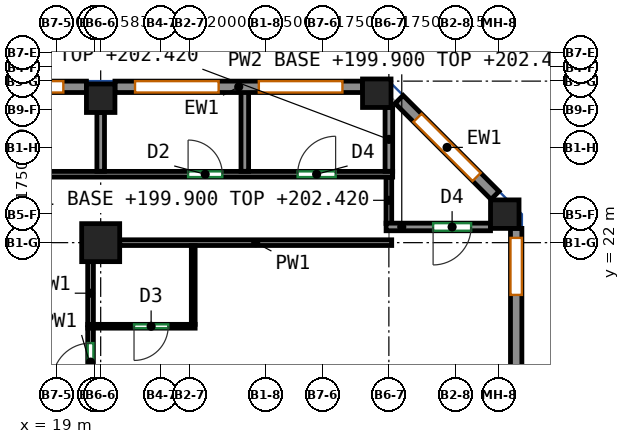
"""IFC4 building model, lengths in metres.
Left out: names, types, materials, properties, quantities, classifications, styles, units other than length and angle.
Written with IfcOpenShell. Run it as: python <this file> out.ifc"""

import sys

from ifc_helpers import new_model, si_unit, direction, frame, frame_2d, origin, origin_2d, place, context, subcontext, project, spatial, rectangle, extrude, source, transform, mapped, element, fill, save


model = new_model("IFC4")
c1 = context("Model", 3, precision=1e-05, world=origin(), true_north=direction((0.0, 1.0)))
c2 = subcontext(c1, "Body", "Model", "MODEL_VIEW")
j1 = project(units=[si_unit("LENGTHUNIT", "METRE"), si_unit("PLANEANGLEUNIT", "RADIAN")], contexts=[c1])
p1 = place(None, origin())
s1 = spatial("IfcSite", under=j1, at=p1, CompositionType="ELEMENT")
p2 = place(p1, origin())
s2 = spatial("IfcBuilding", under=s1, at=p2, CompositionType="ELEMENT")
p3 = place(p2, frame((0.0, 0.0, 199.9)))
s3 = spatial("IfcBuildingStorey", under=s2, at=p3, CompositionType="ELEMENT", Elevation=199.9)
m1 = source(origin(), c2, "Body", "SweptSolid", [
    extrude(rectangle(XDim=1.0, YDim=1.0, at=origin_2d()), origin(), (0.0, 0.0, 1.0), 3.12),
])
p4 = place(p3, frame((20.167, 22.0, 0.0), z_axis=(0.0, 0.0, 1.0), x_axis=(1.0, 0.0, 0.0)))
e1 = element("IfcColumn", 1, at=p4, inside=s3, PredefinedType="COLUMN", context=c2, shape_type="MappedRepresentation", body=[
    mapped(m1, transform((0.0, 0.0, 0.0))),
])
m2 = source(origin(), c2, "Body", "SweptSolid", [
    extrude(rectangle(XDim=0.75, YDim=0.75, at=origin_2d()), origin(), (0.0, 0.0, 1.0), 3.12),
])
for number, where, z_axis, x_axis in (
    (2, (20.167, 25.8, 0.0), (0.0, 0.0, 1.0), (1.0, 0.0, 0.0)),
    (3, (27.432, 25.932, 0.0), (0.0, 0.0, 1.0), (1.0, 0.0, 0.0)),
    (4, (30.8, 22.75, 0.0), (0.0, 0.0, 1.0), (1.0, 0.0, 0.0)),
):
    element("IfcColumn", number, at=place(p3, frame(where, z_axis=z_axis, x_axis=x_axis)), inside=s3, PredefinedType="COLUMN", context=c2, shape_type="MappedRepresentation", body=[
        mapped(m2, transform((0.0, 0.0, 0.0))),
    ])
m3 = source(origin(), c2, "Body", "SweptSolid", [
    extrude(rectangle(XDim=14.0, YDim=0.3, at=frame_2d((7.0, 0.0))), origin(), (0.0, 0.0, 1.0), 3.12),
])
p5 = place(p3, frame((31.1, 8.375, 0.0), z_axis=(0.0, 0.0, 1.0), x_axis=(0.0, 1.0, 0.0)))
e5 = element("IfcWall", 5, at=p5, inside=s3, PredefinedType="SOLIDWALL", context=c2, shape_type="MappedRepresentation", body=[
    mapped(m3, transform((0.0, 0.0, 0.0))),
])
p6 = place(p5, frame((1.75, 0.0, 0.85)))
e6 = element("IfcOpeningElement", 6, at=p6, cuts=e5, PredefinedType="OPENING", context=c2, shape_type="SweptSolid", body=[
    extrude(rectangle(XDim=1.5, YDim=1.95, at=frame_2d((0.75, 0.975))), frame((0.0, 0.16, 0.0), z_axis=(0.0, -1.0, 0.0), x_axis=(1.0, 0.0, 0.0)), (0.0, 0.0, 1.0), 0.32),
])
p7 = place(p5, frame((5.25, 0.0, 0.85)))
e7 = element("IfcOpeningElement", 7, at=p7, cuts=e5, PredefinedType="OPENING", context=c2, shape_type="SweptSolid", body=[
    extrude(rectangle(XDim=1.5, YDim=1.95, at=frame_2d((0.75, 0.975))), frame((0.0, 0.16, 0.0), z_axis=(0.0, -1.0, 0.0), x_axis=(1.0, 0.0, 0.0)), (0.0, 0.0, 1.0), 0.32),
])
p8 = place(p5, frame((8.75, 0.0, 0.85)))
e8 = element("IfcOpeningElement", 8, at=p8, cuts=e5, PredefinedType="OPENING", context=c2, shape_type="SweptSolid", body=[
    extrude(rectangle(XDim=1.5, YDim=1.95, at=frame_2d((0.75, 0.975))), frame((0.0, 0.16, 0.0), z_axis=(0.0, -1.0, 0.0), x_axis=(1.0, 0.0, 0.0)), (0.0, 0.0, 1.0), 0.32),
])
p9 = place(p5, frame((12.25, 0.0, 0.85)))
e9 = element("IfcOpeningElement", 9, at=p9, cuts=e5, PredefinedType="OPENING", context=c2, shape_type="SweptSolid", body=[
    extrude(rectangle(XDim=1.5, YDim=1.95, at=frame_2d((0.75, 0.975))), frame((0.0, 0.16, 0.0), z_axis=(0.0, -1.0, 0.0), x_axis=(1.0, 0.0, 0.0)), (0.0, 0.0, 1.0), 0.32),
])
m4 = source(origin(), c2, "Body", "SweptSolid", [
    extrude(rectangle(XDim=3.571, YDim=0.3, at=frame_2d((1.786, 0.0))), origin(), (0.0, 0.0, 1.0), 3.12),
])
p10 = place(p3, frame((30.544, 23.244, 0.0), z_axis=(0.0, 0.0, 1.0), x_axis=(-0.707140964879, 0.707072595841, 0.0)))
e10 = element("IfcWall", 10, at=p10, inside=s3, PredefinedType="SOLIDWALL", context=c2, shape_type="MappedRepresentation", body=[
    mapped(m4, transform((0.0, 0.0, 0.0))),
])
p11 = place(p10, frame((0.686, 0.0, 0.85)))
e11 = element("IfcOpeningElement", 11, at=p11, cuts=e10, PredefinedType="OPENING", context=c2, shape_type="SweptSolid", body=[
    extrude(rectangle(XDim=2.2, YDim=1.95, at=frame_2d((1.1, 0.975))), frame((0.0, 0.16, 0.0), z_axis=(0.0, -1.0, 0.0), x_axis=(1.0, 0.0, 0.0)), (0.0, 0.0, 1.0), 0.32),
])
m5 = source(origin(), c2, "Body", "SweptSolid", [
    extrude(rectangle(XDim=6.515, YDim=0.3, at=frame_2d((3.258, 0.0))), origin(), (0.0, 0.0, 1.0), 3.12),
])
p12 = place(p3, frame((27.057, 26.1, 0.0), z_axis=(0.0, 0.0, 1.0), x_axis=(-1.0, 0.0, 0.0)))
e12 = element("IfcWall", 12, at=p12, inside=s3, PredefinedType="SOLIDWALL", context=c2, shape_type="MappedRepresentation", body=[
    mapped(m5, transform((0.0, 0.0, 0.0))),
])
p13 = place(p12, frame((0.529, 0.0, 0.85)))
e13 = element("IfcOpeningElement", 13, at=p13, cuts=e12, PredefinedType="OPENING", context=c2, shape_type="SweptSolid", body=[
    extrude(rectangle(XDim=2.2, YDim=1.95, at=frame_2d((1.1, 0.975))), frame((0.0, 0.16, 0.0), z_axis=(0.0, -1.0, 0.0), x_axis=(1.0, 0.0, 0.0)), (0.0, 0.0, 1.0), 0.32),
])
p14 = place(p12, frame((3.786, 0.0, 0.85)))
e14 = element("IfcOpeningElement", 14, at=p14, cuts=e12, PredefinedType="OPENING", context=c2, shape_type="SweptSolid", body=[
    extrude(rectangle(XDim=2.2, YDim=1.95, at=frame_2d((1.1, 0.975))), frame((0.0, 0.16, 0.0), z_axis=(0.0, -1.0, 0.0), x_axis=(1.0, 0.0, 0.0)), (0.0, 0.0, 1.0), 0.32),
])
m6 = source(origin(), c2, "Body", "SweptSolid", [
    extrude(rectangle(XDim=6.833, YDim=0.3, at=frame_2d((3.417, 0.0))), origin(), (0.0, 0.0, 1.0), 3.12),
])
p15 = place(p3, frame((19.792, 26.1, 0.0), z_axis=(0.0, 0.0, 1.0), x_axis=(-1.0, 0.0, 0.0)))
e15 = element("IfcWall", 15, at=p15, inside=s3, PredefinedType="SOLIDWALL", context=c2, shape_type="MappedRepresentation", body=[
    mapped(m6, transform((0.0, 0.0, 0.0))),
])
p16 = place(p15, frame((0.608, 0.0, 0.85)))
e16 = element("IfcOpeningElement", 16, at=p16, cuts=e15, PredefinedType="OPENING", context=c2, shape_type="SweptSolid", body=[
    extrude(rectangle(XDim=2.2, YDim=1.95, at=frame_2d((1.1, 0.975))), frame((0.0, 0.16, 0.0), z_axis=(0.0, -1.0, 0.0), x_axis=(1.0, 0.0, 0.0)), (0.0, 0.0, 1.0), 0.32),
])
p17 = place(p15, frame((4.025, 0.0, 0.85)))
e17 = element("IfcOpeningElement", 17, at=p17, cuts=e15, PredefinedType="OPENING", context=c2, shape_type="SweptSolid", body=[
    extrude(rectangle(XDim=2.2, YDim=1.95, at=frame_2d((1.1, 0.975))), frame((0.0, 0.16, 0.0), z_axis=(0.0, -1.0, 0.0), x_axis=(1.0, 0.0, 0.0)), (0.0, 0.0, 1.0), 0.32),
])
p18 = place(p3, frame((19.9, 17.75, 0.0), z_axis=(0.0, 0.0, 1.0), x_axis=(0.0, 1.0, 0.0)))
e18 = element("IfcWall", 18, at=p18, inside=s3, PredefinedType="PARTITIONING", context=c2, shape_type="SweptSolid", body=[
    extrude(rectangle(XDim=2.01, YDim=0.15, at=frame_2d((1.005, 0.0))), origin(), (0.0, 0.0, 1.0), 3.12),
])
p19 = place(p18, frame((0.607, 0.0, 0.0)))
e19 = element("IfcOpeningElement", 19, at=p19, cuts=e18, PredefinedType="OPENING", context=c2, shape_type="SweptSolid", body=[
    extrude(rectangle(XDim=1.0, YDim=2.1, at=frame_2d((0.5, 1.05))), frame((0.0, 0.085, 0.0), z_axis=(0.0, -1.0, 0.0), x_axis=(1.0, 0.0, 0.0)), (0.0, 0.0, 1.0), 0.17),
])
p20 = place(p3, frame((20.667, 22.0, 0.0), z_axis=(0.0, 0.0, 1.0), x_axis=(1.0, 0.0, 0.0)))
e20 = element("IfcWall", 20, at=p20, inside=s3, PredefinedType="PARTITIONING", context=c2, shape_type="SweptSolid", body=[
    extrude(rectangle(XDim=7.158, YDim=0.15, at=frame_2d((3.579, 0.0))), origin(), (0.0, 0.0, 1.0), 3.12),
])
p21 = place(p3, frame((19.9, 19.84, 0.0), z_axis=(0.0, 0.0, 1.0), x_axis=(0.0, 1.0, 0.0)))
e21 = element("IfcWall", 21, at=p21, inside=s3, PredefinedType="PARTITIONING", context=c2, shape_type="SweptSolid", body=[
    extrude(rectangle(XDim=1.66, YDim=0.15, at=frame_2d((0.83, 0.0))), origin(), (0.0, 0.0, 1.0), 3.12),
])
p22 = place(p3, frame((27.75, 22.503, 0.0), z_axis=(0.0, 0.0, 1.0), x_axis=(0.0, 1.0, 0.0)))
e22 = element("IfcWall", 22, at=p22, inside=s3, PredefinedType="PARTITIONING", context=c2, shape_type="SweptSolid", body=[
    extrude(rectangle(XDim=1.222, YDim=0.15, at=frame_2d((0.611, 0.0))), origin(), (0.0, 0.0, 1.0), 2.52),
])
p23 = place(p3, frame((-17.85, 23.8, 0.0), z_axis=(0.0, 0.0, 1.0), x_axis=(1.0, 0.0, 0.0)))
e23 = element("IfcWall", 23, at=p23, inside=s3, PredefinedType="PARTITIONING", context=c2, shape_type="SweptSolid", body=[
    extrude(rectangle(XDim=45.7, YDim=0.15, at=frame_2d((22.85, 0.0))), origin(), (0.0, 0.0, 1.0), 3.12),
])
p24 = place(p23, frame((0.6, 0.0, 0.0)))
e24 = element("IfcOpeningElement", 24, at=p24, cuts=e23, PredefinedType="OPENING", context=c2, shape_type="SweptSolid", body=[
    extrude(rectangle(XDim=0.9, YDim=2.1, at=frame_2d((0.45, 1.05))), frame((0.0, 0.085, 0.0), z_axis=(0.0, -1.0, 0.0), x_axis=(1.0, 0.0, 0.0)), (0.0, 0.0, 1.0), 0.17),
])
p25 = place(p23, frame((4.081, 0.0, 0.0)))
e25 = element("IfcOpeningElement", 25, at=p25, cuts=e23, PredefinedType="OPENING", context=c2, shape_type="SweptSolid", body=[
    extrude(rectangle(XDim=1.0, YDim=2.1, at=frame_2d((0.5, 1.05))), frame((0.0, 0.085, 0.0), z_axis=(0.0, -1.0, 0.0), x_axis=(1.0, 0.0, 0.0)), (0.0, 0.0, 1.0), 0.17),
])
p26 = place(p23, frame((9.481, 0.0, 0.0)))
e26 = element("IfcOpeningElement", 26, at=p26, cuts=e23, PredefinedType="OPENING", context=c2, shape_type="SweptSolid", body=[
    extrude(rectangle(XDim=0.9, YDim=2.1, at=frame_2d((0.45, 1.05))), frame((0.0, 0.085, 0.0), z_axis=(0.0, -1.0, 0.0), x_axis=(1.0, 0.0, 0.0)), (0.0, 0.0, 1.0), 0.17),
])
p27 = place(p23, frame((12.803, 0.0, 0.0)))
e27 = element("IfcOpeningElement", 27, at=p27, cuts=e23, PredefinedType="OPENING", context=c2, shape_type="SweptSolid", body=[
    extrude(rectangle(XDim=1.0, YDim=2.1, at=frame_2d((0.5, 1.05))), frame((0.0, 0.085, 0.0), z_axis=(0.0, -1.0, 0.0), x_axis=(1.0, 0.0, 0.0)), (0.0, 0.0, 1.0), 0.17),
])
p28 = place(p23, frame((15.489, 0.0, 0.0)))
e28 = element("IfcOpeningElement", 28, at=p28, cuts=e23, PredefinedType="OPENING", context=c2, shape_type="SweptSolid", body=[
    extrude(rectangle(XDim=0.9, YDim=2.1, at=frame_2d((0.45, 1.05))), frame((0.0, 0.085, 0.0), z_axis=(0.0, -1.0, 0.0), x_axis=(1.0, 0.0, 0.0)), (0.0, 0.0, 1.0), 0.17),
])
p29 = place(p23, frame((21.244, 0.0, 0.0)))
e29 = element("IfcOpeningElement", 29, at=p29, cuts=e23, PredefinedType="OPENING", context=c2, shape_type="SweptSolid", body=[
    extrude(rectangle(XDim=0.9, YDim=2.1, at=frame_2d((0.45, 1.05))), frame((0.0, 0.085, 0.0), z_axis=(0.0, -1.0, 0.0), x_axis=(1.0, 0.0, 0.0)), (0.0, 0.0, 1.0), 0.17),
])
p30 = place(p23, frame((23.542, 0.0, 0.0)))
e30 = element("IfcOpeningElement", 30, at=p30, cuts=e23, PredefinedType="OPENING", context=c2, shape_type="SweptSolid", body=[
    extrude(rectangle(XDim=1.0, YDim=2.1, at=frame_2d((0.5, 1.05))), frame((0.0, 0.085, 0.0), z_axis=(0.0, -1.0, 0.0), x_axis=(1.0, 0.0, 0.0)), (0.0, 0.0, 1.0), 0.17),
])
p31 = place(p23, frame((28.841, 0.0, 0.0)))
e31 = element("IfcOpeningElement", 31, at=p31, cuts=e23, PredefinedType="OPENING", context=c2, shape_type="SweptSolid", body=[
    extrude(rectangle(XDim=0.9, YDim=2.1, at=frame_2d((0.45, 1.05))), frame((0.0, 0.085, 0.0), z_axis=(0.0, -1.0, 0.0), x_axis=(1.0, 0.0, 0.0)), (0.0, 0.0, 1.0), 0.17),
])
p32 = place(p23, frame((32.331, 0.0, 0.0)))
e32 = element("IfcOpeningElement", 32, at=p32, cuts=e23, PredefinedType="OPENING", context=c2, shape_type="SweptSolid", body=[
    extrude(rectangle(XDim=1.0, YDim=2.1, at=frame_2d((0.5, 1.05))), frame((0.0, 0.085, 0.0), z_axis=(0.0, -1.0, 0.0), x_axis=(1.0, 0.0, 0.0)), (0.0, 0.0, 1.0), 0.17),
])
p33 = place(p23, frame((35.42, 0.0, 0.0)))
e33 = element("IfcOpeningElement", 33, at=p33, cuts=e23, PredefinedType="OPENING", context=c2, shape_type="SweptSolid", body=[
    extrude(rectangle(XDim=0.9, YDim=2.1, at=frame_2d((0.45, 1.05))), frame((0.0, 0.085, 0.0), z_axis=(0.0, -1.0, 0.0), x_axis=(1.0, 0.0, 0.0)), (0.0, 0.0, 1.0), 0.17),
])
p34 = place(p23, frame((40.317, 0.0, 0.0)))
e34 = element("IfcOpeningElement", 34, at=p34, cuts=e23, PredefinedType="OPENING", context=c2, shape_type="SweptSolid", body=[
    extrude(rectangle(XDim=0.9, YDim=2.1, at=frame_2d((0.45, 1.05))), frame((0.0, 0.085, 0.0), z_axis=(0.0, -1.0, 0.0), x_axis=(1.0, 0.0, 0.0)), (0.0, 0.0, 1.0), 0.17),
])
p35 = place(p23, frame((43.199, 0.0, 0.0)))
e35 = element("IfcOpeningElement", 35, at=p35, cuts=e23, PredefinedType="OPENING", context=c2, shape_type="SweptSolid", body=[
    extrude(rectangle(XDim=1.0, YDim=2.1, at=frame_2d((0.5, 1.05))), frame((0.0, 0.085, 0.0), z_axis=(0.0, -1.0, 0.0), x_axis=(1.0, 0.0, 0.0)), (0.0, 0.0, 1.0), 0.17),
])
p36 = place(p3, frame((22.652, 19.8, 0.0), z_axis=(0.0, 0.0, 1.0), x_axis=(-1.0, 0.0, 0.0)))
e36 = element("IfcWall", 36, at=p36, inside=s3, PredefinedType="PARTITIONING", context=c2, shape_type="SweptSolid", body=[
    extrude(rectangle(XDim=2.825, YDim=0.1, at=frame_2d((1.413, 0.0))), origin(), (0.0, 0.0, 1.0), 3.12),
])
p37 = place(p36, frame((0.708, 0.0, 0.0)))
e37 = element("IfcOpeningElement", 37, at=p37, cuts=e36, PredefinedType="OPENING", context=c2, shape_type="SweptSolid", body=[
    extrude(rectangle(XDim=0.9, YDim=2.1, at=frame_2d((0.45, 1.05))), frame((0.0, 0.06, 0.0), z_axis=(0.0, -1.0, 0.0), x_axis=(1.0, 0.0, 0.0)), (0.0, 0.0, 1.0), 0.12),
])
p38 = place(p3, frame((22.602, 19.85, 0.0), z_axis=(0.0, 0.0, 1.0), x_axis=(0.0, 1.0, 0.0)))
e38 = element("IfcWall", 38, at=p38, inside=s3, PredefinedType="PARTITIONING", context=c2, shape_type="SweptSolid", body=[
    extrude(rectangle(XDim=2.073, YDim=0.1, at=frame_2d((1.037, 0.0))), origin(), (0.0, 0.0, 1.0), 3.12),
])
p39 = place(p3, frame((30.425, 22.413, 0.0), z_axis=(0.0, 0.0, 1.0), x_axis=(-1.0, 0.0, 0.0)))
e39 = element("IfcWall", 39, at=p39, inside=s3, PredefinedType="PARTITIONING", context=c2, shape_type="SweptSolid", body=[
    extrude(rectangle(XDim=2.748, YDim=0.2, at=frame_2d((1.374, 0.0))), origin(), (0.0, 0.0, 1.0), 2.52),
])
p40 = place(p39, frame((0.511, 0.0, 0.0)))
e40 = element("IfcOpeningElement", 40, at=p40, cuts=e39, PredefinedType="OPENING", context=c2, shape_type="SweptSolid", body=[
    extrude(rectangle(XDim=1.0, YDim=2.1, at=frame_2d((0.5, 1.05))), frame((0.0, 0.11, 0.0), z_axis=(0.0, -1.0, 0.0), x_axis=(1.0, 0.0, 0.0)), (0.0, 0.0, 1.0), 0.22),
])
p41 = place(p3, frame((27.75, 25.557, 0.0), z_axis=(0.0, 0.0, 1.0), x_axis=(0.0, -1.0, 0.0)))
e41 = element("IfcWall", 41, at=p41, inside=s3, PredefinedType="PARTITIONING", context=c2, shape_type="SweptSolid", body=[
    extrude(rectangle(XDim=1.68, YDim=0.2, at=frame_2d((0.84, 0.0))), origin(), (0.0, 0.0, 1.0), 2.52),
])
p42 = place(p3, frame((20.167, 23.877, 0.0), z_axis=(0.0, 0.0, 1.0), x_axis=(0.0, 1.0, 0.0)))
e42 = element("IfcWall", 42, at=p42, inside=s3, PredefinedType="PARTITIONING", context=c2, shape_type="SweptSolid", body=[
    extrude(rectangle(XDim=1.548, YDim=0.2, at=frame_2d((0.774, 0.0))), origin(), (0.0, 0.0, 1.0), 3.12),
])
p43 = place(p3, frame((23.959, 23.877, 0.0), z_axis=(0.0, 0.0, 1.0), x_axis=(0.0, 1.0, 0.0)))
e43 = element("IfcWall", 43, at=p43, inside=s3, PredefinedType="PARTITIONING", context=c2, shape_type="SweptSolid", body=[
    extrude(rectangle(XDim=2.123, YDim=0.2, at=frame_2d((1.062, 0.0))), origin(), (0.0, 0.0, 1.0), 3.12),
])
p44 = place(p9, origin())
e44 = element("IfcWindow", 44, at=p44, inside=s3, PartitioningType="SINGLE_PANEL", PredefinedType="WINDOW", context=c2, shape_type="SweptSolid", body=[
    extrude(rectangle(XDim=1.5, YDim=1.95, at=frame_2d((0.75, 0.975))), frame((0.0, 0.03, 0.0), z_axis=(0.0, -1.0, 0.0), x_axis=(1.0, 0.0, 0.0)), (0.0, 0.0, 1.0), 0.06),
])
fill(e9, e44)
p45 = place(p11, origin())
e45 = element("IfcWindow", 45, at=p45, inside=s3, PartitioningType="SINGLE_PANEL", PredefinedType="WINDOW", context=c2, shape_type="SweptSolid", body=[
    extrude(rectangle(XDim=2.2, YDim=1.95, at=frame_2d((1.1, 0.975))), frame((0.0, 0.03, 0.0), z_axis=(0.0, -1.0, 0.0), x_axis=(1.0, 0.0, 0.0)), (0.0, 0.0, 1.0), 0.06),
])
fill(e11, e45)
p46 = place(p13, origin())
e46 = element("IfcWindow", 46, at=p46, inside=s3, PartitioningType="SINGLE_PANEL", PredefinedType="WINDOW", context=c2, shape_type="SweptSolid", body=[
    extrude(rectangle(XDim=2.2, YDim=1.95, at=frame_2d((1.1, 0.975))), frame((0.0, 0.03, 0.0), z_axis=(0.0, -1.0, 0.0), x_axis=(1.0, 0.0, 0.0)), (0.0, 0.0, 1.0), 0.06),
])
fill(e13, e46)
p47 = place(p14, origin())
e47 = element("IfcWindow", 47, at=p47, inside=s3, PartitioningType="SINGLE_PANEL", PredefinedType="WINDOW", context=c2, shape_type="SweptSolid", body=[
    extrude(rectangle(XDim=2.2, YDim=1.95, at=frame_2d((1.1, 0.975))), frame((0.0, 0.03, 0.0), z_axis=(0.0, -1.0, 0.0), x_axis=(1.0, 0.0, 0.0)), (0.0, 0.0, 1.0), 0.06),
])
fill(e14, e47)
p48 = place(p16, origin())
e48 = element("IfcWindow", 48, at=p48, inside=s3, PartitioningType="SINGLE_PANEL", PredefinedType="WINDOW", context=c2, shape_type="SweptSolid", body=[
    extrude(rectangle(XDim=2.2, YDim=1.95, at=frame_2d((1.1, 0.975))), frame((0.0, 0.03, 0.0), z_axis=(0.0, -1.0, 0.0), x_axis=(1.0, 0.0, 0.0)), (0.0, 0.0, 1.0), 0.06),
])
fill(e16, e48)
p49 = place(p19, origin())
e49 = element("IfcDoor", 49, at=p49, inside=s3, OperationType="SINGLE_SWING_LEFT", PredefinedType="DOOR", context=c2, shape_type="SweptSolid", body=[
    extrude(rectangle(XDim=1.0, YDim=2.1, at=frame_2d((0.5, 1.05))), frame((0.0, 0.025, 0.0), z_axis=(0.0, -1.0, 0.0), x_axis=(1.0, 0.0, 0.0)), (0.0, 0.0, 1.0), 0.05),
])
fill(e19, e49)
p50 = place(p37, origin())
e50 = element("IfcDoor", 50, at=p50, inside=s3, OperationType="SINGLE_SWING_RIGHT", PredefinedType="DOOR", context=c2, shape_type="SweptSolid", body=[
    extrude(rectangle(XDim=0.9, YDim=2.1, at=frame_2d((0.45, 1.05))), frame((0.0, 0.025, 0.0), z_axis=(0.0, -1.0, 0.0), x_axis=(1.0, 0.0, 0.0)), (0.0, 0.0, 1.0), 0.05),
])
fill(e37, e50)
p51 = place(p40, origin())
e51 = element("IfcDoor", 51, at=p51, inside=s3, OperationType="SINGLE_SWING_RIGHT", PredefinedType="DOOR", context=c2, shape_type="SweptSolid", body=[
    extrude(rectangle(XDim=1.0, YDim=2.1, at=frame_2d((0.5, 1.05))), frame((0.0, 0.025, 0.0), z_axis=(0.0, -1.0, 0.0), x_axis=(1.0, 0.0, 0.0)), (0.0, 0.0, 1.0), 0.05),
])
fill(e40, e51)
p52 = place(p34, origin())
e52 = element("IfcDoor", 52, at=p52, inside=s3, OperationType="SINGLE_SWING_LEFT", PredefinedType="DOOR", context=c2, shape_type="SweptSolid", body=[
    extrude(rectangle(XDim=0.9, YDim=2.1, at=frame_2d((0.45, 1.05))), frame((0.0, 0.025, 0.0), z_axis=(0.0, -1.0, 0.0), x_axis=(1.0, 0.0, 0.0)), (0.0, 0.0, 1.0), 0.05),
])
fill(e34, e52)
p53 = place(p35, origin())
e53 = element("IfcDoor", 53, at=p53, inside=s3, OperationType="SINGLE_SWING_RIGHT", PredefinedType="DOOR", context=c2, shape_type="SweptSolid", body=[
    extrude(rectangle(XDim=1.0, YDim=2.1, at=frame_2d((0.5, 1.05))), frame((0.0, 0.025, 0.0), z_axis=(0.0, -1.0, 0.0), x_axis=(1.0, 0.0, 0.0)), (0.0, 0.0, 1.0), 0.05),
])
fill(e35, e53)
save(model, sys.argv[1])
